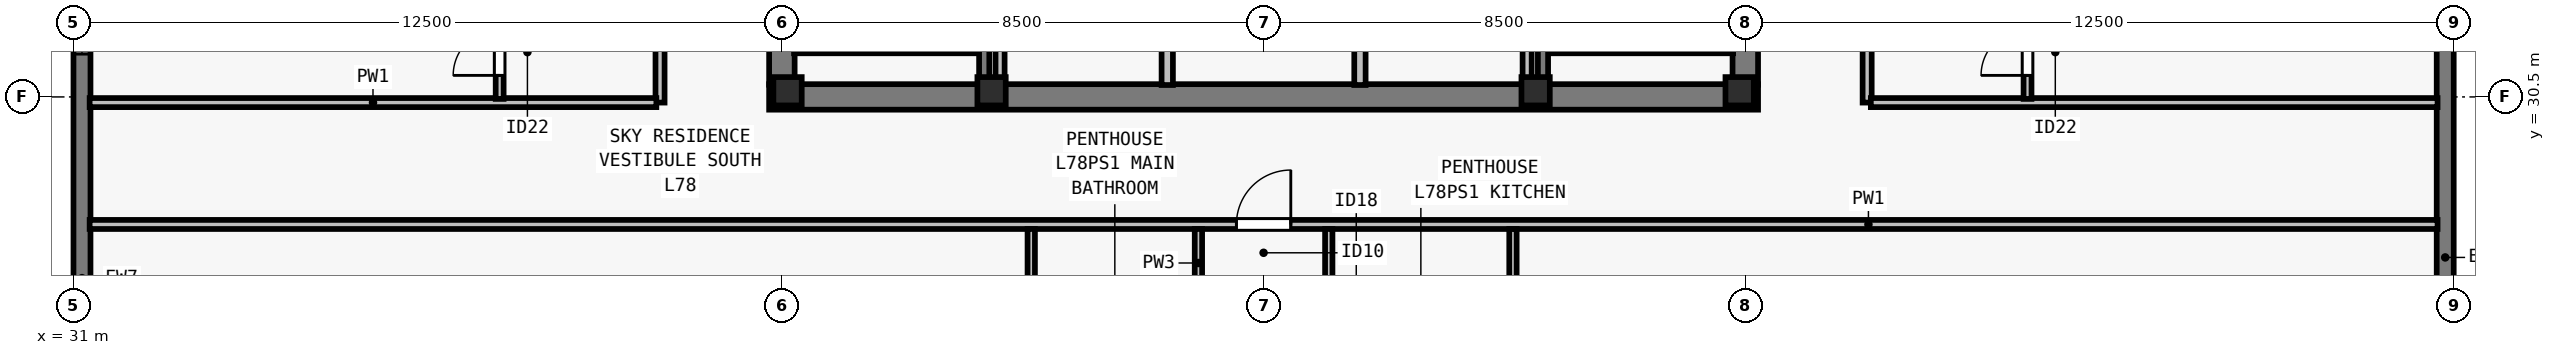
"""IFC4 building model, lengths in metres.
Left out: names, types, materials, properties, quantities, classifications, styles, units other than length and angle.
Written with IfcOpenShell. Run it as: python <this file> out.ifc"""

import sys

from ifc_helpers import new_model, si_unit, direction, frame, frame_2d, origin, origin_2d, place, context, subcontext, project, spatial, rectangle, i_section, extrude, element, fill, save


model = new_model("IFC4")
c1 = context("Model", 3, precision=1e-05, world=origin(), true_north=direction((0.0, 1.0)))
c2 = subcontext(c1, "Body", "Model", "MODEL_VIEW")
j1 = project(units=[si_unit("LENGTHUNIT", "METRE"), si_unit("PLANEANGLEUNIT", "RADIAN")], contexts=[c1])
p1 = place(None, origin())
s1 = spatial("IfcSite", under=j1, at=p1, CompositionType="ELEMENT")
p2 = place(p1, origin())
s2 = spatial("IfcBuilding", under=s1, at=p2, CompositionType="ELEMENT")
p3 = place(p2, frame((0.0, 0.0, 284.0)))
s3 = spatial("IfcBuildingStorey", under=s2, at=p3, CompositionType="ELEMENT", Elevation=284.0)
for number, where, z_axis, x_axis in (
    (1, (43.6, 30.6, 0.0), (0.0, 0.0, 1.0), (1.0, 0.0, 0.0)),
    (2, (47.2, 30.6, 0.0), (0.0, 0.0, 1.0), (1.0, 0.0, 0.0)),
    (3, (56.8, 30.6, 0.0), (0.0, 0.0, 1.0), (1.0, 0.0, 0.0)),
    (4, (60.4, 30.6, 0.0), (0.0, 0.0, 1.0), (1.0, 0.0, 0.0)),
):
    element("IfcColumn", number, at=place(p3, frame(where, z_axis=z_axis, x_axis=x_axis)), inside=s3, PredefinedType="COLUMN", context=c2, shape_type="SweptSolid", body=[
        extrude(i_section(OverallWidth=0.5, OverallDepth=0.5, WebThickness=0.028, FlangeThickness=0.045, at=origin_2d()), origin(), (0.0, 0.0, 1.0), 3.5),
    ])
p4 = place(p3, frame((31.15, 23.5, 0.0), z_axis=(0.0, 0.0, 1.0), x_axis=(0.0, 1.0, 0.0)))
e5 = element("IfcWall", 5, at=p4, inside=s3, PredefinedType="SOLIDWALL", context=c2, shape_type="SweptSolid", body=[
    extrude(rectangle(XDim=30.722, YDim=0.3, at=frame_2d((15.361, 0.0))), origin(), (0.0, 0.0, 1.0), 3.29),
])
p5 = place(p4, frame((7.756, 0.0, 0.8)))
e6 = element("IfcOpeningElement", 6, at=p5, cuts=e5, PredefinedType="OPENING", context=c2, shape_type="SweptSolid", body=[
    extrude(rectangle(XDim=2.0, YDim=1.758, at=frame_2d((1.0, 0.879))), frame((0.0, 0.16, 0.0), z_axis=(0.0, -1.0, 0.0), x_axis=(1.0, 0.0, 0.0)), (0.0, 0.0, 1.0), 0.32),
])
p6 = place(p4, frame((12.617, 0.0, 0.8)))
e7 = element("IfcOpeningElement", 7, at=p6, cuts=e5, PredefinedType="OPENING", context=c2, shape_type="SweptSolid", body=[
    extrude(rectangle(XDim=1.65, YDim=1.758, at=frame_2d((0.825, 0.879))), frame((0.0, 0.16, 0.0), z_axis=(0.0, -1.0, 0.0), x_axis=(1.0, 0.0, 0.0)), (0.0, 0.0, 1.0), 0.32),
])
p7 = place(p4, frame((17.53, 0.0, 0.8)))
e8 = element("IfcOpeningElement", 8, at=p7, cuts=e5, PredefinedType="OPENING", context=c2, shape_type="SweptSolid", body=[
    extrude(rectangle(XDim=2.0, YDim=1.758, at=frame_2d((1.0, 0.879))), frame((0.0, 0.16, 0.0), z_axis=(0.0, -1.0, 0.0), x_axis=(1.0, 0.0, 0.0)), (0.0, 0.0, 1.0), 0.32),
])
p8 = place(p4, frame((21.142, 0.0, 0.8)))
e9 = element("IfcOpeningElement", 9, at=p8, cuts=e5, PredefinedType="OPENING", context=c2, shape_type="SweptSolid", body=[
    extrude(rectangle(XDim=1.65, YDim=1.758, at=frame_2d((0.825, 0.879))), frame((0.0, 0.16, 0.0), z_axis=(0.0, -1.0, 0.0), x_axis=(1.0, 0.0, 0.0)), (0.0, 0.0, 1.0), 0.32),
])
p9 = place(p4, frame((26.63, 0.0, 0.8)))
e10 = element("IfcOpeningElement", 10, at=p9, cuts=e5, PredefinedType="OPENING", context=c2, shape_type="SweptSolid", body=[
    extrude(rectangle(XDim=0.9, YDim=1.75, at=frame_2d((0.45, 0.875))), frame((0.0, 0.16, 0.0), z_axis=(0.0, -1.0, 0.0), x_axis=(1.0, 0.0, 0.0)), (0.0, 0.0, 1.0), 0.32),
])
p10 = place(p3, frame((72.85, 54.5, 0.0), z_axis=(0.0, 0.0, 1.0), x_axis=(0.0, -1.0, 0.0)))
e11 = element("IfcWall", 11, at=p10, inside=s3, PredefinedType="SOLIDWALL", context=c2, shape_type="SweptSolid", body=[
    extrude(rectangle(XDim=30.722, YDim=0.3, at=frame_2d((15.361, 0.0))), origin(), (0.0, 0.0, 1.0), 3.29),
])
p11 = place(p10, frame((7.756, 0.0, 0.8)))
e12 = element("IfcOpeningElement", 12, at=p11, cuts=e11, PredefinedType="OPENING", context=c2, shape_type="SweptSolid", body=[
    extrude(rectangle(XDim=2.0, YDim=1.758, at=frame_2d((1.0, 0.879))), frame((0.0, 0.16, 0.0), z_axis=(0.0, -1.0, 0.0), x_axis=(1.0, 0.0, 0.0)), (0.0, 0.0, 1.0), 0.32),
])
p12 = place(p10, frame((11.768, 0.0, 0.8)))
e13 = element("IfcOpeningElement", 13, at=p12, cuts=e11, PredefinedType="OPENING", context=c2, shape_type="SweptSolid", body=[
    extrude(rectangle(XDim=1.65, YDim=1.758, at=frame_2d((0.825, 0.879))), frame((0.0, 0.16, 0.0), z_axis=(0.0, -1.0, 0.0), x_axis=(1.0, 0.0, 0.0)), (0.0, 0.0, 1.0), 0.32),
])
p13 = place(p10, frame((16.28, 0.0, 0.8)))
e14 = element("IfcOpeningElement", 14, at=p13, cuts=e11, PredefinedType="OPENING", context=c2, shape_type="SweptSolid", body=[
    extrude(rectangle(XDim=2.0, YDim=1.758, at=frame_2d((1.0, 0.879))), frame((0.0, 0.16, 0.0), z_axis=(0.0, -1.0, 0.0), x_axis=(1.0, 0.0, 0.0)), (0.0, 0.0, 1.0), 0.32),
])
p14 = place(p10, frame((21.142, 0.0, 0.8)))
e15 = element("IfcOpeningElement", 15, at=p14, cuts=e11, PredefinedType="OPENING", context=c2, shape_type="SweptSolid", body=[
    extrude(rectangle(XDim=1.65, YDim=1.758, at=frame_2d((0.825, 0.879))), frame((0.0, 0.16, 0.0), z_axis=(0.0, -1.0, 0.0), x_axis=(1.0, 0.0, 0.0)), (0.0, 0.0, 1.0), 0.32),
])
p15 = place(p3, frame((43.275, 30.5, 0.0), z_axis=(0.0, 0.0, 1.0), x_axis=(1.0, 0.0, 0.0)))
e16 = element("IfcWall", 16, at=p15, inside=s3, PredefinedType="SHEAR", context=c2, shape_type="SweptSolid", body=[
    extrude(rectangle(XDim=17.45, YDim=0.45, at=frame_2d((8.725, 0.0))), origin(), (0.0, 0.0, 1.0), 3.29),
])
for number, where, z_axis, x_axis in (
    (17, (43.5, 30.715, 0.0), (0.0, 0.0, 1.0), (0.0, 1.0, 0.0)),
    (18, (60.5, 30.715, 0.0), (0.0, 0.0, 1.0), (0.0, 1.0, 0.0)),
):
    element("IfcWall", number, at=place(p3, frame(where, z_axis=z_axis, x_axis=x_axis)), inside=s3, PredefinedType="SHEAR", context=c2, shape_type="SweptSolid", body=[
        extrude(rectangle(XDim=8.035, YDim=0.45, at=frame_2d((4.018, 0.0))), origin(), (0.0, 0.0, 1.0), 3.29),
    ])
p16 = place(p3, frame((50.3, 30.71, 0.0), z_axis=(0.0, 0.0, 1.0), x_axis=(0.0, 1.0, 0.0)))
e19 = element("IfcWall", 19, at=p16, inside=s3, PredefinedType="SOLIDWALL", context=c2, shape_type="SweptSolid", body=[
    extrude(rectangle(XDim=7.905, YDim=0.2, at=frame_2d((3.953, 0.0))), origin(), (0.0, 0.0, 1.0), 3.29),
])
p17 = place(p16, frame((3.34, 0.0, 0.0)))
e20 = element("IfcOpeningElement", 20, at=p17, cuts=e19, PredefinedType="OPENING", context=c2, shape_type="SweptSolid", body=[
    extrude(rectangle(XDim=0.9, YDim=2.12, at=frame_2d((0.45, 1.06))), frame((0.0, 0.11, 0.0), z_axis=(0.0, -1.0, 0.0), x_axis=(1.0, 0.0, 0.0)), (0.0, 0.0, 1.0), 0.22),
])
p18 = place(p3, frame((53.7, 30.71, 0.0), z_axis=(0.0, 0.0, 1.0), x_axis=(0.0, 1.0, 0.0)))
e21 = element("IfcWall", 21, at=p18, inside=s3, PredefinedType="SOLIDWALL", context=c2, shape_type="SweptSolid", body=[
    extrude(rectangle(XDim=7.905, YDim=0.2, at=frame_2d((3.953, 0.0))), origin(), (0.0, 0.0, 1.0), 3.29),
])
p19 = place(p18, frame((1.39, 0.0, 0.0)))
e22 = element("IfcOpeningElement", 22, at=p19, cuts=e21, PredefinedType="OPENING", context=c2, shape_type="SweptSolid", body=[
    extrude(rectangle(XDim=0.95, YDim=2.12, at=frame_2d((0.475, 1.06))), frame((0.0, 0.11, 0.0), z_axis=(0.0, -1.0, 0.0), x_axis=(1.0, 0.0, 0.0)), (0.0, 0.0, 1.0), 0.22),
])
p20 = place(p18, frame((5.39, 0.0, 0.0)))
e23 = element("IfcOpeningElement", 23, at=p20, cuts=e21, PredefinedType="OPENING", context=c2, shape_type="SweptSolid", body=[
    extrude(rectangle(XDim=0.85, YDim=2.12, at=frame_2d((0.425, 1.06))), frame((0.0, 0.11, 0.0), z_axis=(0.0, -1.0, 0.0), x_axis=(1.0, 0.0, 0.0)), (0.0, 0.0, 1.0), 0.22),
])
for number, where, z_axis, x_axis in (
    (24, (47.35, 30.71, 0.0), (0.0, 0.0, 1.0), (0.0, 1.0, 0.0)),
    (25, (56.65, 30.71, 0.0), (0.0, 0.0, 1.0), (0.0, 1.0, 0.0)),
):
    element("IfcWall", number, at=place(p3, frame(where, z_axis=z_axis, x_axis=x_axis)), inside=s3, PredefinedType="PARTITIONING", context=c2, shape_type="SweptSolid", body=[
        extrude(rectangle(XDim=7.905, YDim=0.16, at=frame_2d((3.953, 0.0))), origin(), (0.0, 0.0, 1.0), 3.29),
    ])
p21 = place(p3, frame((31.285, 28.25, 0.0), z_axis=(0.0, 0.0, 1.0), x_axis=(1.0, 0.0, 0.0)))
e26 = element("IfcWall", 26, at=p21, inside=s3, PredefinedType="PARTITIONING", context=c2, shape_type="SweptSolid", body=[
    extrude(rectangle(XDim=41.43, YDim=0.16, at=frame_2d((20.715, 0.0))), origin(), (0.0, 0.0, 1.0), 3.009),
])
p22 = place(p21, frame((20.235, 0.0, 0.0)))
e27 = element("IfcOpeningElement", 27, at=p22, cuts=e26, PredefinedType="OPENING", context=c2, shape_type="SweptSolid", body=[
    extrude(rectangle(XDim=0.96, YDim=2.18, at=frame_2d((0.48, 1.09))), frame((0.0, 0.09, 0.0), z_axis=(0.0, -1.0, 0.0), x_axis=(1.0, 0.0, 0.0)), (0.0, 0.0, 1.0), 0.18),
])
p23 = place(p3, frame((41.35, 30.4, 0.0), z_axis=(0.0, 0.0, 1.0), x_axis=(0.0, 1.0, 0.0)))
e28 = element("IfcWall", 28, at=p23, inside=s3, PredefinedType="PARTITIONING", context=c2, shape_type="SweptSolid", body=[
    extrude(rectangle(XDim=17.2, YDim=0.16, at=frame_2d((8.6, 0.0))), origin(), (0.0, 0.0, 1.0), 3.009),
])
p24 = place(p23, frame((8.12, 0.0, 0.0)))
e29 = element("IfcOpeningElement", 29, at=p24, cuts=e28, PredefinedType="OPENING", context=c2, shape_type="SweptSolid", body=[
    extrude(rectangle(XDim=0.96, YDim=2.18, at=frame_2d((0.48, 1.09))), frame((0.0, 0.09, 0.0), z_axis=(0.0, -1.0, 0.0), x_axis=(1.0, 0.0, 0.0)), (0.0, 0.0, 1.0), 0.18),
])
p25 = place(p3, frame((62.65, 30.4, 0.0), z_axis=(0.0, 0.0, 1.0), x_axis=(0.0, 1.0, 0.0)))
e30 = element("IfcWall", 30, at=p25, inside=s3, PredefinedType="PARTITIONING", context=c2, shape_type="SweptSolid", body=[
    extrude(rectangle(XDim=17.2, YDim=0.16, at=frame_2d((8.6, 0.0))), origin(), (0.0, 0.0, 1.0), 3.29),
])
p26 = place(p25, frame((8.12, 0.0, 0.0)))
e31 = element("IfcOpeningElement", 31, at=p26, cuts=e30, PredefinedType="OPENING", context=c2, shape_type="SweptSolid", body=[
    extrude(rectangle(XDim=0.96, YDim=2.18, at=frame_2d((0.48, 1.09))), frame((0.0, 0.09, 0.0), z_axis=(0.0, -1.0, 0.0), x_axis=(1.0, 0.0, 0.0)), (0.0, 0.0, 1.0), 0.18),
])
for number, where, z_axis, x_axis in (
    (32, (31.285, 30.4, 0.0), (0.0, 0.0, 1.0), (1.0, 0.0, 0.0)),
    (33, (62.715, 30.4, 0.0), (0.0, 0.0, 1.0), (1.0, 0.0, 0.0)),
):
    element("IfcWall", number, at=place(p3, frame(where, z_axis=z_axis, x_axis=x_axis)), inside=s3, PredefinedType="PARTITIONING", context=c2, shape_type="SweptSolid", body=[
        extrude(rectangle(XDim=10.0, YDim=0.16, at=frame_2d((5.0, 0.0))), origin(), (0.0, 0.0, 1.0), 3.29),
    ])
p27 = place(p3, frame((47.9, 25.42, 0.0), z_axis=(0.0, 0.0, 1.0), x_axis=(0.0, 1.0, 0.0)))
e34 = element("IfcWall", 34, at=p27, inside=s3, PredefinedType="PLUMBINGWALL", context=c2, shape_type="SweptSolid", body=[
    extrude(rectangle(XDim=2.75, YDim=0.13, at=frame_2d((1.375, 0.0))), origin(), (0.0, 0.0, 1.0), 3.29),
])
p28 = place(p3, frame((50.85, 25.42, 0.0), z_axis=(0.0, 0.0, 1.0), x_axis=(0.0, 1.0, 0.0)))
e35 = element("IfcWall", 35, at=p28, inside=s3, PredefinedType="PLUMBINGWALL", context=c2, shape_type="SweptSolid", body=[
    extrude(rectangle(XDim=2.75, YDim=0.13, at=frame_2d((1.375, 0.0))), origin(), (0.0, 0.0, 1.0), 3.29),
])
p29 = place(p28, frame((0.55, 0.0, 0.0)))
e36 = element("IfcOpeningElement", 36, at=p29, cuts=e35, PredefinedType="OPENING", context=c2, shape_type="SweptSolid", body=[
    extrude(rectangle(XDim=0.85, YDim=2.08, at=frame_2d((0.425, 1.04))), frame((0.0, 0.075, 0.0), z_axis=(0.0, -1.0, 0.0), x_axis=(1.0, 0.0, 0.0)), (0.0, 0.0, 1.0), 0.15),
])
p30 = place(p3, frame((56.4, 25.42, 0.0), z_axis=(0.0, 0.0, 1.0), x_axis=(0.0, 1.0, 0.0)))
e37 = element("IfcWall", 37, at=p30, inside=s3, PredefinedType="PLUMBINGWALL", context=c2, shape_type="SweptSolid", body=[
    extrude(rectangle(XDim=2.75, YDim=0.13, at=frame_2d((1.375, 0.0))), origin(), (0.0, 0.0, 1.0), 3.29),
])
p31 = place(p3, frame((53.15, 25.42, 0.0), z_axis=(0.0, 0.0, 1.0), x_axis=(0.0, 1.0, 0.0)))
e38 = element("IfcWall", 38, at=p31, inside=s3, PredefinedType="PLUMBINGWALL", context=c2, shape_type="SweptSolid", body=[
    extrude(rectangle(XDim=2.75, YDim=0.13, at=frame_2d((1.375, 0.0))), origin(), (0.0, 0.0, 1.0), 3.009),
])
p32 = place(p31, frame((0.55, 0.0, 0.0)))
e39 = element("IfcOpeningElement", 39, at=p32, cuts=e38, PredefinedType="OPENING", context=c2, shape_type="SweptSolid", body=[
    extrude(rectangle(XDim=0.88, YDim=2.1, at=frame_2d((0.44, 1.05))), frame((0.0, 0.075, 0.0), z_axis=(0.0, -1.0, 0.0), x_axis=(1.0, 0.0, 0.0)), (0.0, 0.0, 1.0), 0.15),
])
p33 = place(p3, frame((38.52, 30.465, 0.0), z_axis=(0.0, 0.0, 1.0), x_axis=(0.0, 1.0, 0.0)))
e40 = element("IfcWall", 40, at=p33, inside=s3, PredefinedType="PARTITIONING", context=c2, shape_type="SweptSolid", body=[
    extrude(rectangle(XDim=4.16, YDim=0.14, at=frame_2d((2.08, 0.0))), origin(), (0.0, 0.0, 1.0), 3.29),
])
p34 = place(p33, frame((0.415, 0.0, 0.0)))
e41 = element("IfcOpeningElement", 41, at=p34, cuts=e40, PredefinedType="OPENING", context=c2, shape_type="SweptSolid", body=[
    extrude(rectangle(XDim=0.82, YDim=2.1, at=frame_2d((0.41, 1.05))), frame((0.0, 0.08, 0.0), z_axis=(0.0, -1.0, 0.0), x_axis=(1.0, 0.0, 0.0)), (0.0, 0.0, 1.0), 0.16),
])
p35 = place(p3, frame((65.48, 30.465, 0.0), z_axis=(0.0, 0.0, 1.0), x_axis=(0.0, 1.0, 0.0)))
e42 = element("IfcWall", 42, at=p35, inside=s3, PredefinedType="PARTITIONING", context=c2, shape_type="SweptSolid", body=[
    extrude(rectangle(XDim=4.16, YDim=0.14, at=frame_2d((2.08, 0.0))), origin(), (0.0, 0.0, 1.0), 3.29),
])
p36 = place(p35, frame((0.415, 0.0, 0.0)))
e43 = element("IfcOpeningElement", 43, at=p36, cuts=e42, PredefinedType="OPENING", context=c2, shape_type="SweptSolid", body=[
    extrude(rectangle(XDim=0.82, YDim=2.1, at=frame_2d((0.41, 1.05))), frame((0.0, 0.08, 0.0), z_axis=(0.0, -1.0, 0.0), x_axis=(1.0, 0.0, 0.0)), (0.0, 0.0, 1.0), 0.16),
])
p37 = place(p3, frame((43.715, 31.36, 0.0), z_axis=(0.0, 0.0, 1.0), x_axis=(1.0, 0.0, 0.0)))
e44 = element("IfcWall", 44, at=p37, inside=s3, PredefinedType="SOLIDWALL", context=c2, shape_type="SweptSolid", body=[
    extrude(rectangle(XDim=3.28, YDim=0.18, at=frame_2d((1.64, 0.0))), origin(), (0.0, 0.0, 1.0), 3.29),
])
p38 = place(p3, frame((47.07, 38.78, 0.0), z_axis=(0.0, 0.0, 1.0), x_axis=(0.0, -1.0, 0.0)))
e45 = element("IfcWall", 45, at=p38, inside=s3, PredefinedType="SOLIDWALL", context=c2, shape_type="SweptSolid", body=[
    extrude(rectangle(XDim=8.067, YDim=0.18, at=frame_2d((4.034, 0.0))), origin(), (0.0, 0.0, 1.0), 3.29),
])
p39 = place(p3, frame((57.005, 31.36, 0.0), z_axis=(0.0, 0.0, 1.0), x_axis=(1.0, 0.0, 0.0)))
e46 = element("IfcWall", 46, at=p39, inside=s3, PredefinedType="SOLIDWALL", context=c2, shape_type="SweptSolid", body=[
    extrude(rectangle(XDim=3.28, YDim=0.18, at=frame_2d((1.64, 0.0))), origin(), (0.0, 0.0, 1.0), 3.29),
])
p40 = place(p3, frame((56.93, 38.78, 0.0), z_axis=(0.0, 0.0, 1.0), x_axis=(0.0, -1.0, 0.0)))
e47 = element("IfcWall", 47, at=p40, inside=s3, PredefinedType="SOLIDWALL", context=c2, shape_type="SweptSolid", body=[
    extrude(rectangle(XDim=8.067, YDim=0.18, at=frame_2d((4.034, 0.0))), origin(), (0.0, 0.0, 1.0), 3.29),
])
p41 = place(p5, origin())
e48 = element("IfcWindow", 48, at=p41, inside=s3, PartitioningType="SINGLE_PANEL", PredefinedType="WINDOW", context=c2, shape_type="SweptSolid", body=[
    extrude(rectangle(XDim=2.0, YDim=1.758, at=frame_2d((1.0, 0.879))), frame((0.0, -0.05, 0.0), z_axis=(0.0, -1.0, 0.0), x_axis=(1.0, 0.0, 0.0)), (0.0, 0.0, 1.0), 0.06),
])
fill(e6, e48)
p42 = place(p22, origin())
e49 = element("IfcDoor", 49, at=p42, inside=s3, OperationType="SINGLE_SWING_RIGHT", PredefinedType="DOOR", context=c2, shape_type="SweptSolid", body=[
    extrude(rectangle(XDim=0.96, YDim=2.18, at=frame_2d((0.48, 1.09))), frame((0.0, 0.025, 0.0), z_axis=(0.0, -1.0, 0.0), x_axis=(1.0, 0.0, 0.0)), (0.0, 0.0, 1.0), 0.05),
])
fill(e27, e49)
p43 = place(p34, origin())
e50 = element("IfcDoor", 50, at=p43, inside=s3, OperationType="SINGLE_SWING_LEFT", PredefinedType="DOOR", context=c2, shape_type="SweptSolid", body=[
    extrude(rectangle(XDim=0.82, YDim=2.1, at=frame_2d((0.41, 1.05))), frame((0.0, 0.025, 0.0), z_axis=(0.0, -1.0, 0.0), x_axis=(1.0, 0.0, 0.0)), (0.0, 0.0, 1.0), 0.05),
])
fill(e41, e50)
p44 = place(p36, origin())
e51 = element("IfcDoor", 51, at=p44, inside=s3, OperationType="SINGLE_SWING_LEFT", PredefinedType="DOOR", context=c2, shape_type="SweptSolid", body=[
    extrude(rectangle(XDim=0.82, YDim=2.1, at=frame_2d((0.41, 1.05))), frame((0.0, 0.025, 0.0), z_axis=(0.0, -1.0, 0.0), x_axis=(1.0, 0.0, 0.0)), (0.0, 0.0, 1.0), 0.05),
])
fill(e43, e51)
save(model, sys.argv[1])
